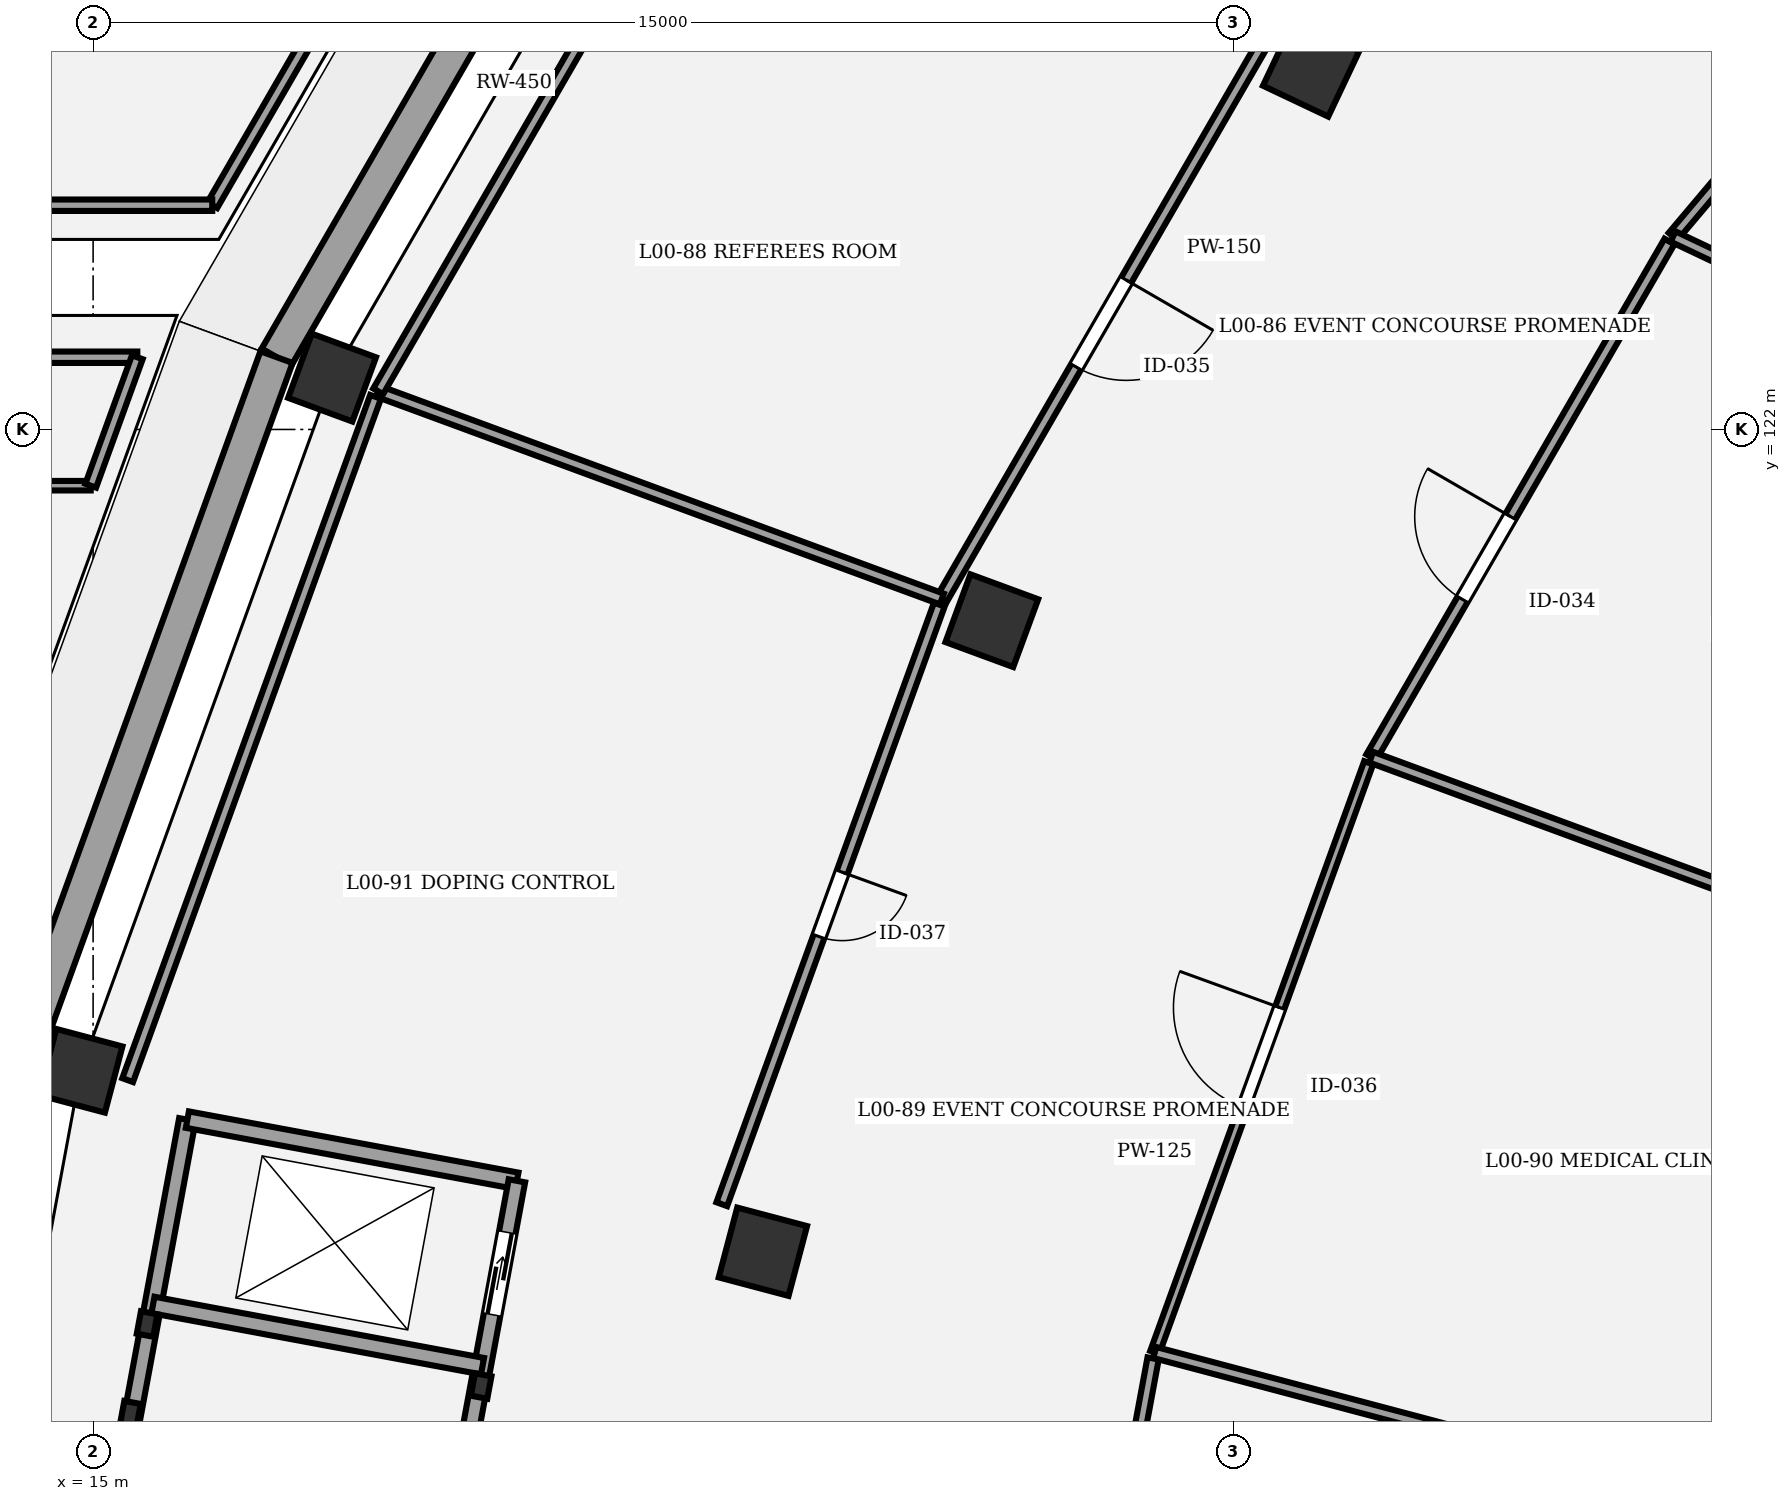
"""IFC4 building model, lengths in metres.
Left out: names, types, materials, properties, quantities, classifications, styles, units other than length and angle.
Written with IfcOpenShell. Run it as: python <this file> out.ifc"""

import sys

from ifc_helpers import new_model, si_unit, direction, frame, frame_2d, origin, origin_2d, place, context, subcontext, project, spatial, rectangle, extrude, element, fill, save


model = new_model("IFC4")
c1 = context("Model", 3, precision=1e-05, world=origin(), true_north=direction((0.0, 1.0)))
c2 = subcontext(c1, "Body", "Model", "MODEL_VIEW")
j1 = project(units=[si_unit("LENGTHUNIT", "METRE"), si_unit("PLANEANGLEUNIT", "RADIAN")], contexts=[c1])
p1 = place(None, origin())
s1 = spatial("IfcSite", under=j1, at=p1, CompositionType="ELEMENT")
p2 = place(p1, origin())
s2 = spatial("IfcBuilding", under=s1, at=p2, CompositionType="ELEMENT")
p3 = place(p2, origin())
s3 = spatial("IfcBuildingStorey", under=s2, at=p3, CompositionType="ELEMENT", Elevation=0.0)
for number, where, z_axis, x_axis in (
    (1, (31.024, 126.748, 0.0), (0.0, 0.0, 1.0), (-0.904, 0.428, 0.0)),
    (2, (26.824, 119.484, 0.0), (0.0, 0.0, 1.0), (-0.938, 0.346, 0.0)),
):
    element("IfcColumn", number, at=place(p3, frame(where, z_axis=z_axis, x_axis=x_axis)), inside=s3, PredefinedType="COLUMN", context=c2, shape_type="SweptSolid", body=[
        extrude(rectangle(XDim=0.95, YDim=0.95, at=origin_2d()), origin(), (0.0, 0.0, 1.0), 5.4),
    ])
p4 = place(p3, frame((18.144, 122.682, 0.0), z_axis=(0.0, 0.0, 1.0), x_axis=(-0.938372433776, 0.34562577382, 0.0)))
e3 = element("IfcColumn", 3, at=p4, inside=s3, PredefinedType="COLUMN", context=c2, shape_type="SweptSolid", body=[
    extrude(rectangle(XDim=0.9, YDim=0.9, at=origin_2d()), origin(), (0.0, 0.0, 1.0), 5.4),
])
p5 = place(p3, frame((23.812, 111.182, 0.0), z_axis=(0.0, 0.0, 1.0), x_axis=(-0.966600102017, 0.256289373133, 0.0)))
e4 = element("IfcColumn", 4, at=p5, inside=s3, PredefinedType="COLUMN", context=c2, shape_type="SweptSolid", body=[
    extrude(rectangle(XDim=0.95, YDim=0.95, at=origin_2d()), origin(), (0.0, 0.0, 1.0), 5.4),
])
p6 = place(p3, frame((14.835, 113.562, 0.0), z_axis=(0.0, 0.0, 1.0), x_axis=(-0.966600102017, 0.256289373133, 0.0)))
e5 = element("IfcColumn", 5, at=p6, inside=s3, PredefinedType="COLUMN", context=c2, shape_type="SweptSolid", body=[
    extrude(rectangle(XDim=0.9, YDim=0.9, at=origin_2d()), origin(), (0.0, 0.0, 1.0), 5.4),
])
p7 = place(p3, frame((14.204, 113.73, 0.0), z_axis=(0.0, 0.0, 1.0), x_axis=(-0.256289373133, -0.966600102017, 0.0)))
e6 = element("IfcColumn", 6, at=p7, inside=s3, PredefinedType="PILASTER", context=c2, shape_type="SweptSolid", body=[
    extrude(rectangle(XDim=0.6, YDim=0.4, at=origin_2d()), origin(), (0.0, 0.0, 1.0), 5.4),
])
p8 = place(p3, frame((22.061, 130.991, 0.0), z_axis=(0.0, 0.0, 1.0), x_axis=(-0.500560521423, -0.86570154464, 0.0)))
e7 = element("IfcWall", 7, at=p8, inside=s3, PredefinedType="USERDEFINED", context=c2, shape_type="SweptSolid", body=[
    extrude(rectangle(XDim=9.286, YDim=0.45, at=frame_2d((4.643, 0.0))), origin(), (0.0, 0.0, 1.0), 4.25),
])
p9 = place(p3, frame((17.413, 122.952, 0.0), z_axis=(0.0, 0.0, 1.0), x_axis=(-0.341033041448, -0.940051309579, 0.0)))
e8 = element("IfcWall", 8, at=p9, inside=s3, PredefinedType="USERDEFINED", context=c2, shape_type="SweptSolid", body=[
    extrude(rectangle(XDim=9.775, YDim=0.45, at=frame_2d((4.887, 0.0))), origin(), (0.0, 0.0, 1.0), 4.25),
])
for number, where, z_axis, x_axis in (
    (9, (20.105, 109.415, 0.0), (0.0, 0.0, 1.0), (0.183, 0.983, 0.0)),
    (10, (15.71, 110.231, 0.0), (0.0, 0.0, 1.0), (0.183, 0.983, 0.0)),
    (11, (15.491, 109.052, 0.0), (0.0, 0.0, 1.0), (0.183, 0.983, 0.0)),
):
    element("IfcColumn", number, at=place(p3, frame(where, z_axis=z_axis, x_axis=x_axis)), inside=s3, PredefinedType="COLUMN", context=c2, shape_type="SweptSolid", body=[
        extrude(rectangle(XDim=0.3, YDim=0.22, at=origin_2d()), origin(), (0.0, 0.0, 1.0), 5.4),
    ])
p10 = place(p3, frame((14.228, 102.085, 0.0), z_axis=(0.0, 0.0, 1.0), x_axis=(0.182574755222, 0.983191974517, 0.0)))
e12 = element("IfcWall", 12, at=p10, inside=s3, PredefinedType="SHEAR", context=c2, shape_type="SweptSolid", body=[
    extrude(rectangle(XDim=11.02, YDim=0.22, at=frame_2d((5.51, 0.0))), origin(), (0.0, 0.0, 1.0), 5.15),
])
p11 = place(p3, frame((20.576, 112.115, 0.0), z_axis=(0.0, 0.0, 1.0), x_axis=(-0.983189729951, 0.18258684213, 0.0)))
e13 = element("IfcWall", 13, at=p11, inside=s3, PredefinedType="SHEAR", context=c2, shape_type="SweptSolid", body=[
    extrude(rectangle(XDim=4.41, YDim=0.22, at=frame_2d((2.205, 0.0))), origin(), (0.0, 0.0, 1.0), 5.15),
])
p12 = place(p3, frame((18.564, 101.28, 0.0), z_axis=(0.0, 0.0, 1.0), x_axis=(0.182570778451, 0.983192712979, 0.0)))
e14 = element("IfcWall", 14, at=p12, inside=s3, PredefinedType="SHEAR", context=c2, shape_type="SweptSolid", body=[
    extrude(rectangle(XDim=11.02, YDim=0.22, at=frame_2d((5.51, 0.0))), origin(), (0.0, 0.0, 1.0), 5.15),
])
p13 = place(p12, frame((0.3, 0.0, 0.0)))
e15 = element("IfcOpeningElement", 15, at=p13, cuts=e14, PredefinedType="OPENING", context=c2, shape_type="SweptSolid", body=[
    extrude(rectangle(XDim=1.15, YDim=2.15, at=frame_2d((0.575, 1.075))), frame((0.0, 0.12, 0.0), z_axis=(0.0, -1.0, 0.0), x_axis=(1.0, 0.0, 0.0)), (0.0, 0.0, 1.0), 0.24),
])
p14 = place(p12, frame((9.23, 0.0, 0.0)))
e16 = element("IfcOpeningElement", 16, at=p14, cuts=e14, PredefinedType="OPENING", context=c2, shape_type="SweptSolid", body=[
    extrude(rectangle(XDim=1.1, YDim=2.15, at=frame_2d((0.55, 1.075))), frame((0.0, 0.12, 0.0), z_axis=(0.0, -1.0, 0.0), x_axis=(1.0, 0.0, 0.0)), (0.0, 0.0, 1.0), 0.24),
])
p15 = place(p3, frame((20.123, 109.677, 0.0), z_axis=(0.0, 0.0, 1.0), x_axis=(-0.983201511677, 0.182523388739, 0.0)))
e17 = element("IfcWall", 17, at=p15, inside=s3, PredefinedType="SHEAR", context=c2, shape_type="SweptSolid", body=[
    extrude(rectangle(XDim=4.41, YDim=0.22, at=frame_2d((2.205, 0.0))), origin(), (0.0, 0.0, 1.0), 5.15),
])
p16 = place(p3, frame((35.788, 124.538, 0.0), z_axis=(0.0, 0.0, 1.0), x_axis=(0.645180817826, 0.764029915847, 0.0)))
e18 = element("IfcWall", 18, at=p16, inside=s3, PredefinedType="PARTITIONING", context=c2, shape_type="SweptSolid", body=[
    extrude(rectangle(XDim=7.779, YDim=0.15, at=frame_2d((3.89, 0.0))), origin(), (0.0, 0.0, 1.0), 4.15),
])
p17 = place(p16, frame((2.406, 0.0, 0.0)))
e19 = element("IfcOpeningElement", 19, at=p17, cuts=e18, PredefinedType="OPENING", context=c2, shape_type="SweptSolid", body=[
    extrude(rectangle(XDim=1.18, YDim=2.3, at=frame_2d((0.59, 1.15))), frame((0.0, 0.085, 0.0), z_axis=(0.0, -1.0, 0.0), x_axis=(1.0, 0.0, 0.0)), (0.0, 0.0, 1.0), 0.17),
])
p18 = place(p3, frame((31.817, 117.688, 0.0), z_axis=(0.0, 0.0, 1.0), x_axis=(0.500584301803, 0.865687794063, 0.0)))
e20 = element("IfcWall", 20, at=p18, inside=s3, PredefinedType="PARTITIONING", context=c2, shape_type="SweptSolid", body=[
    extrude(rectangle(XDim=7.837, YDim=0.15, at=frame_2d((3.918, 0.0))), origin(), (0.0, 0.0, 1.0), 4.15),
])
p19 = place(p18, frame((2.398, 0.0, 0.0)))
e21 = element("IfcOpeningElement", 21, at=p19, cuts=e20, PredefinedType="OPENING", context=c2, shape_type="SweptSolid", body=[
    extrude(rectangle(XDim=1.26, YDim=2.3, at=frame_2d((0.63, 1.15))), frame((0.0, 0.085, 0.0), z_axis=(0.0, -1.0, 0.0), x_axis=(1.0, 0.0, 0.0)), (0.0, 0.0, 1.0), 0.17),
])
p20 = place(p3, frame((30.359, 127.019, 0.0), z_axis=(0.0, 0.0, 1.0), x_axis=(-0.500559280672, -0.865702262059, 0.0)))
e22 = element("IfcWall", 22, at=p20, inside=s3, PredefinedType="PARTITIONING", context=c2, shape_type="SweptSolid", body=[
    extrude(rectangle(XDim=8.375, YDim=0.15, at=frame_2d((4.187, 0.0))), origin(), (0.0, 0.0, 1.0), 4.15),
])
p21 = place(p20, frame((3.527, 0.0, 0.0)))
e23 = element("IfcOpeningElement", 23, at=p21, cuts=e22, PredefinedType="OPENING", context=c2, shape_type="SweptSolid", body=[
    extrude(rectangle(XDim=1.32, YDim=2.3, at=frame_2d((0.66, 1.15))), frame((0.0, 0.085, 0.0), z_axis=(0.0, -1.0, 0.0), x_axis=(1.0, 0.0, 0.0)), (0.0, 0.0, 1.0), 0.17),
])
p22 = place(p3, frame((28.968, 109.856, 0.0), z_axis=(0.0, 0.0, 1.0), x_axis=(0.341044733968, 0.940047067669, 0.0)))
e24 = element("IfcWall", 24, at=p22, inside=s3, PredefinedType="PARTITIONING", context=c2, shape_type="SweptSolid", body=[
    extrude(rectangle(XDim=8.254, YDim=0.125, at=frame_2d((4.127, 0.0))), origin(), (0.0, 0.0, 1.0), 4.15),
])
p23 = place(p22, frame((3.427, 0.0, 0.0)))
e25 = element("IfcOpeningElement", 25, at=p23, cuts=e24, PredefinedType="OPENING", context=c2, shape_type="SweptSolid", body=[
    extrude(rectangle(XDim=1.4, YDim=2.3, at=frame_2d((0.7, 1.15))), frame((0.0, 0.073, 0.0), z_axis=(0.0, -1.0, 0.0), x_axis=(1.0, 0.0, 0.0)), (0.0, 0.0, 1.0), 0.145),
])
p24 = place(p3, frame((26.134, 119.696, 0.0), z_axis=(0.0, 0.0, 1.0), x_axis=(-0.341044550343, -0.940047134287, 0.0)))
e26 = element("IfcWall", 26, at=p24, inside=s3, PredefinedType="PARTITIONING", context=c2, shape_type="SweptSolid", body=[
    extrude(rectangle(XDim=8.392, YDim=0.15, at=frame_2d((4.196, 0.0))), origin(), (0.0, 0.0, 1.0), 4.15),
])
p25 = place(p24, frame((3.746, 0.0, 0.0)))
e27 = element("IfcOpeningElement", 27, at=p25, cuts=e26, PredefinedType="OPENING", context=c2, shape_type="SweptSolid", body=[
    extrude(rectangle(XDim=0.9, YDim=2.1, at=frame_2d((0.45, 1.05))), frame((0.0, 0.085, 0.0), z_axis=(0.0, -1.0, 0.0), x_axis=(1.0, 0.0, 0.0)), (0.0, 0.0, 1.0), 0.17),
])
p26 = place(p3, frame((27.251, 100.651, 0.0), z_axis=(0.0, 0.0, 1.0), x_axis=(0.182600545941, 0.983187184936, 0.0)))
e28 = element("IfcWall", 28, at=p26, inside=s3, PredefinedType="PARTITIONING", context=c2, shape_type="SweptSolid", body=[
    extrude(rectangle(XDim=9.284, YDim=0.15, at=frame_2d((4.642, 0.0))), origin(), (0.0, 0.0, 1.0), 4.15),
])
p27 = place(p26, frame((4.172, 0.0, 0.0)))
e29 = element("IfcOpeningElement", 29, at=p27, cuts=e28, PredefinedType="OPENING", context=c2, shape_type="SweptSolid", body=[
    extrude(rectangle(XDim=0.94, YDim=2.1, at=frame_2d((0.47, 1.05))), frame((0.0, 0.085, 0.0), z_axis=(0.0, -1.0, 0.0), x_axis=(1.0, 0.0, 0.0)), (0.0, 0.0, 1.0), 0.17),
])
p28 = place(p3, frame((14.969, 121.26, 0.0), z_axis=(0.0, 0.0, 1.0), x_axis=(-1.0, 0.0, 0.0)))
e30 = element("IfcWall", 30, at=p28, inside=s3, PredefinedType="PARTITIONING", context=c2, shape_type="SweptSolid", body=[
    extrude(rectangle(XDim=10.608, YDim=0.125, at=frame_2d((5.304, 0.0))), origin(), (0.0, 0.0, 1.0), 4.15),
])
p29 = place(p28, frame((1.348, 0.0, 0.0)))
e31 = element("IfcOpeningElement", 31, at=p29, cuts=e30, PredefinedType="OPENING", context=c2, shape_type="SweptSolid", body=[
    extrude(rectangle(XDim=1.4, YDim=2.3, at=frame_2d((0.7, 1.15))), frame((0.0, 0.073, 0.0), z_axis=(0.0, -1.0, 0.0), x_axis=(1.0, 0.0, 0.0)), (0.0, 0.0, 1.0), 0.145),
])
p30 = place(p3, frame((50.158, 117.736, 0.0), z_axis=(0.0, 0.0, 1.0), x_axis=(-0.903856618289, 0.427835498263, 0.0)))
e32 = element("IfcWall", 32, at=p30, inside=s3, PredefinedType="PARTITIONING", context=c2, shape_type="SweptSolid", body=[
    extrude(rectangle(XDim=15.899, YDim=0.15, at=frame_2d((7.95, 0.0))), origin(), (0.0, 0.0, 1.0), 4.15),
])
p31 = place(p3, frame((46.909, 112.128, 0.0), z_axis=(0.0, 0.0, 1.0), x_axis=(-0.938344671795, 0.345701138143, 0.0)))
e33 = element("IfcWall", 33, at=p31, inside=s3, PredefinedType="PARTITIONING", context=c2, shape_type="SweptSolid", body=[
    extrude(rectangle(XDim=16.083, YDim=0.15, at=frame_2d((8.042, 0.0))), origin(), (0.0, 0.0, 1.0), 4.15),
])
p32 = place(p3, frame((26.167, 119.769, 0.0), z_axis=(0.0, 0.0, 1.0), x_axis=(-0.938352081903, 0.34568102405, 0.0)))
e34 = element("IfcWall", 34, at=p32, inside=s3, PredefinedType="PARTITIONING", context=c2, shape_type="SweptSolid", body=[
    extrude(rectangle(XDim=7.904, YDim=0.15, at=frame_2d((3.952, 0.0))), origin(), (0.0, 0.0, 1.0), 4.15),
])
p33 = place(p3, frame((18.75, 122.501, 0.0), z_axis=(0.0, 0.0, 1.0), x_axis=(0.500574107164, 0.865693689036, 0.0)))
e35 = element("IfcWall", 35, at=p33, inside=s3, PredefinedType="PARTITIONING", context=c2, shape_type="SweptSolid", body=[
    extrude(rectangle(XDim=9.08, YDim=0.15, at=frame_2d((4.54, 0.0))), origin(), (0.0, 0.0, 1.0), 4.15),
])
p34 = place(p3, frame((44.576, 105.717, 0.0), z_axis=(0.0, 0.0, 1.0), x_axis=(-0.966587096108, 0.256338420135, 0.0)))
e36 = element("IfcWall", 36, at=p34, inside=s3, PredefinedType="PARTITIONING", context=c2, shape_type="SweptSolid", body=[
    extrude(rectangle(XDim=16.148, YDim=0.15, at=frame_2d((8.074, 0.0))), origin(), (0.0, 0.0, 1.0), 4.15),
])
p35 = place(p3, frame((15.455, 113.44, 0.0), z_axis=(0.0, 0.0, 1.0), x_axis=(0.341041892941, 0.940048098375, 0.0)))
e37 = element("IfcWall", 37, at=p35, inside=s3, PredefinedType="PARTITIONING", context=c2, shape_type="SweptSolid", body=[
    extrude(rectangle(XDim=9.562, YDim=0.15, at=frame_2d((4.781, 0.0))), origin(), (0.0, 0.0, 1.0), 4.15),
])
p36 = place(p3, frame((20.593, 131.913, 0.0), z_axis=(0.0, 0.0, 1.0), x_axis=(-0.500545605998, -0.865710168773, 0.0)))
e38 = element("IfcWall", 38, at=p36, inside=s3, PredefinedType="PARTITIONING", context=c2, shape_type="SweptSolid", body=[
    extrude(rectangle(XDim=8.043, YDim=0.15, at=frame_2d((4.021, 0.0))), origin(), (0.0, 0.0, 1.0), 4.15),
])
p37 = place(p3, frame((16.567, 124.95, 0.0), z_axis=(0.0, 0.0, 1.0), x_axis=(-1.0, 0.0, 0.0)))
e39 = element("IfcWall", 39, at=p37, inside=s3, PredefinedType="PARTITIONING", context=c2, shape_type="SweptSolid", body=[
    extrude(rectangle(XDim=16.017, YDim=0.15, at=frame_2d((8.009, 0.0))), origin(), (0.0, 0.0, 1.0), 4.15),
])
p38 = place(p3, frame((4.36, 122.95, 0.0), z_axis=(0.0, 0.0, 1.0), x_axis=(1.0, 0.0, 0.0)))
e40 = element("IfcWall", 40, at=p38, inside=s3, PredefinedType="PARTITIONING", context=c2, shape_type="SweptSolid", body=[
    extrude(rectangle(XDim=11.221, YDim=0.15, at=frame_2d((5.611, 0.0))), origin(), (0.0, 0.0, 1.0), 4.15),
])
p39 = place(p3, frame((15.582, 122.95, 0.0), z_axis=(0.0, 0.0, 1.0), x_axis=(-0.341012375502, -0.940058806541, 0.0)))
e41 = element("IfcWall", 41, at=p39, inside=s3, PredefinedType="PARTITIONING", context=c2, shape_type="SweptSolid", body=[
    extrude(rectangle(XDim=1.798, YDim=0.15, at=frame_2d((0.899, 0.0))), origin(), (0.0, 0.0, 1.0), 4.15),
])
p40 = place(p14, origin())
e42 = element("IfcDoor", 42, at=p40, inside=s3, OperationType="DOUBLE_DOOR_SLIDING", PredefinedType="DOOR", context=c2, shape_type="SweptSolid", body=[
    extrude(rectangle(XDim=1.1, YDim=2.15, at=frame_2d((0.55, 1.075))), frame((0.0, 0.025, 0.0), z_axis=(0.0, -1.0, 0.0), x_axis=(1.0, 0.0, 0.0)), (0.0, 0.0, 1.0), 0.05),
])
fill(e16, e42)
p41 = place(p19, origin())
e43 = element("IfcDoor", 43, at=p41, inside=s3, OperationType="SINGLE_SWING_RIGHT", PredefinedType="DOOR", context=c2, shape_type="SweptSolid", body=[
    extrude(rectangle(XDim=1.26, YDim=2.3, at=frame_2d((0.63, 1.15))), frame((0.0, 0.025, 0.0), z_axis=(0.0, -1.0, 0.0), x_axis=(1.0, 0.0, 0.0)), (0.0, 0.0, 1.0), 0.05),
])
fill(e21, e43)
p42 = place(p21, origin())
e44 = element("IfcDoor", 44, at=p42, inside=s3, OperationType="SINGLE_SWING_LEFT", PredefinedType="DOOR", context=c2, shape_type="SweptSolid", body=[
    extrude(rectangle(XDim=1.32, YDim=2.3, at=frame_2d((0.66, 1.15))), frame((0.0, 0.025, 0.0), z_axis=(0.0, -1.0, 0.0), x_axis=(1.0, 0.0, 0.0)), (0.0, 0.0, 1.0), 0.05),
])
fill(e23, e44)
p43 = place(p23, origin())
e45 = element("IfcDoor", 45, at=p43, inside=s3, OperationType="SINGLE_SWING_RIGHT", PredefinedType="DOOR", context=c2, shape_type="SweptSolid", body=[
    extrude(rectangle(XDim=1.4, YDim=2.3, at=frame_2d((0.7, 1.15))), frame((0.0, 0.025, 0.0), z_axis=(0.0, -1.0, 0.0), x_axis=(1.0, 0.0, 0.0)), (0.0, 0.0, 1.0), 0.05),
])
fill(e25, e45)
p44 = place(p25, origin())
e46 = element("IfcDoor", 46, at=p44, inside=s3, OperationType="SINGLE_SWING_LEFT", PredefinedType="DOOR", context=c2, shape_type="SweptSolid", body=[
    extrude(rectangle(XDim=0.9, YDim=2.1, at=frame_2d((0.45, 1.05))), frame((0.0, 0.025, 0.0), z_axis=(0.0, -1.0, 0.0), x_axis=(1.0, 0.0, 0.0)), (0.0, 0.0, 1.0), 0.05),
])
fill(e27, e46)
save(model, sys.argv[1])
